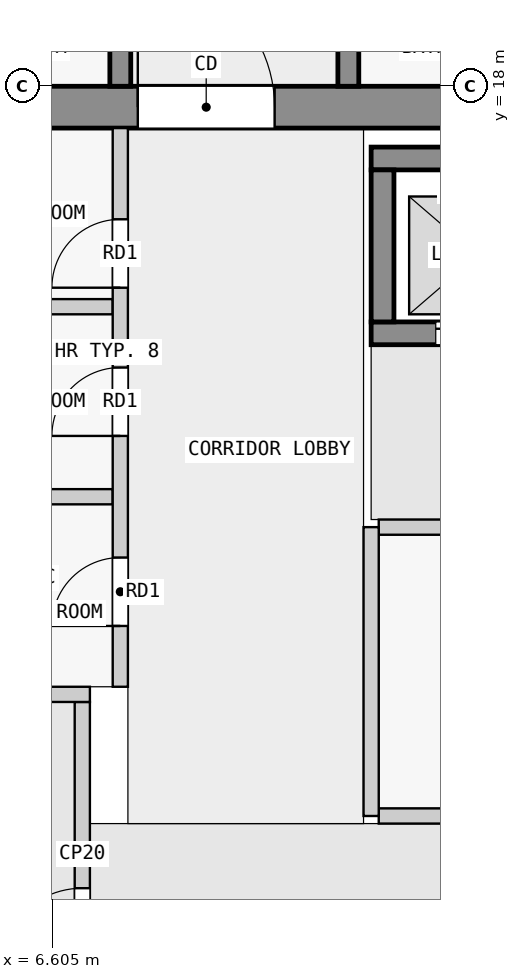
"""IFC4 building model, lengths in metres.
Left out: names, types, materials, properties, quantities, classifications, styles, units other than length and angle.
Written with IfcOpenShell. Run it as: python <this file> out.ifc"""

import sys

from ifc_helpers import new_model, si_unit, direction, frame, frame_2d, origin, place, context, subcontext, project, spatial, rectangle, extrude, element, fill, save


model = new_model("IFC4")
c1 = context("Model", 3, precision=1e-05, world=origin(), true_north=direction((0.0, 1.0)))
c2 = subcontext(c1, "Body", "Model", "MODEL_VIEW")
j1 = project(units=[si_unit("LENGTHUNIT", "METRE"), si_unit("PLANEANGLEUNIT", "RADIAN")], contexts=[c1])
p1 = place(None, origin())
s1 = spatial("IfcSite", under=j1, at=p1, CompositionType="ELEMENT")
p2 = place(p1, origin())
s2 = spatial("IfcBuilding", under=s1, at=p2, CompositionType="ELEMENT")
p3 = place(p2, frame((0.0, 0.0, 194.4)))
s3 = spatial("IfcBuildingStorey", under=s2, at=p3, CompositionType="ELEMENT", Elevation=194.4)
p4 = place(p3, frame((1.38, 17.725, 0.0), z_axis=(0.0, 0.0, 1.0), x_axis=(1.0, 0.0, 0.0)))
e1 = element("IfcWall", 1, at=p4, inside=s3, PredefinedType="SHEAR", context=c2, shape_type="SweptSolid", body=[
    extrude(rectangle(XDim=21.12, YDim=0.55, at=frame_2d((10.56, 0.0))), origin(), (0.0, 0.0, 1.0), 3.25),
])
p5 = place(p4, frame((6.35, 0.0, 0.0)))
e2 = element("IfcOpeningElement", 2, at=p5, cuts=e1, PredefinedType="OPENING", context=c2, shape_type="SweptSolid", body=[
    extrude(rectangle(XDim=1.8, YDim=2.1, at=frame_2d((0.9, 1.05))), frame((0.0, 0.285, 0.0), z_axis=(0.0, -1.0, 0.0), x_axis=(1.0, 0.0, 0.0)), (0.0, 0.0, 1.0), 0.57),
])
p6 = place(p3, frame((10.8, 17.05, 0.0), z_axis=(0.0, 0.0, 1.0), x_axis=(1.0, 0.0, 0.0)))
e3 = element("IfcWall", 3, at=p6, inside=s3, PredefinedType="SHEAR", context=c2, shape_type="SweptSolid", body=[
    extrude(rectangle(XDim=7.8, YDim=0.3, at=frame_2d((3.9, 0.0))), origin(), (0.0, 0.0, 1.0), 3.25),
])
p7 = place(p3, frame((10.8, 14.75, 0.0), z_axis=(0.0, 0.0, 1.0), x_axis=(1.0, 0.0, 0.0)))
e4 = element("IfcWall", 4, at=p7, inside=s3, PredefinedType="SHEAR", context=c2, shape_type="SweptSolid", body=[
    extrude(rectangle(XDim=7.8, YDim=0.3, at=frame_2d((3.9, 0.0))), origin(), (0.0, 0.0, 1.0), 3.25),
])
p8 = place(p7, frame((0.85, 0.0, 0.0)))
e5 = element("IfcOpeningElement", 5, at=p8, cuts=e4, PredefinedType="OPENING", context=c2, shape_type="SweptSolid", body=[
    extrude(rectangle(XDim=1.1, YDim=2.1, at=frame_2d((0.55, 1.05))), frame((0.0, 0.16, 0.0), z_axis=(0.0, -1.0, 0.0), x_axis=(1.0, 0.0, 0.0)), (0.0, 0.0, 1.0), 0.32),
])
p9 = place(p7, frame((3.35, 0.0, 0.0)))
e6 = element("IfcOpeningElement", 6, at=p9, cuts=e4, PredefinedType="OPENING", context=c2, shape_type="SweptSolid", body=[
    extrude(rectangle(XDim=1.1, YDim=2.1, at=frame_2d((0.55, 1.05))), frame((0.0, 0.16, 0.0), z_axis=(0.0, -1.0, 0.0), x_axis=(1.0, 0.0, 0.0)), (0.0, 0.0, 1.0), 0.32),
])
p10 = place(p7, frame((5.85, 0.0, 0.0)))
e7 = element("IfcOpeningElement", 7, at=p10, cuts=e4, PredefinedType="OPENING", context=c2, shape_type="SweptSolid", body=[
    extrude(rectangle(XDim=1.1, YDim=2.1, at=frame_2d((0.55, 1.05))), frame((0.0, 0.16, 0.0), z_axis=(0.0, -1.0, 0.0), x_axis=(1.0, 0.0, 0.0)), (0.0, 0.0, 1.0), 0.32),
])
p11 = place(p3, frame((10.95, 14.9, 0.0), z_axis=(0.0, 0.0, 1.0), x_axis=(0.0, 1.0, 0.0)))
e8 = element("IfcWall", 8, at=p11, inside=s3, PredefinedType="SHEAR", context=c2, shape_type="SweptSolid", body=[
    extrude(rectangle(XDim=2.0, YDim=0.3, at=frame_2d((1.0, 0.0))), origin(), (0.0, 0.0, 1.0), 3.25),
])
p12 = place(p3, frame((7.5, 18.0, 0.0), z_axis=(0.0, 0.0, 1.0), x_axis=(0.0, 1.0, 0.0)))
e9 = element("IfcWall", 9, at=p12, inside=s3, PredefinedType="SHEAR", context=c2, shape_type="SweptSolid", body=[
    extrude(rectangle(XDim=27.0, YDim=0.275, at=frame_2d((13.5, 0.0))), origin(), (0.0, 0.0, 1.0), 3.25),
])
p13 = place(p12, frame((1.75, 0.0, 0.0)))
e10 = element("IfcOpeningElement", 10, at=p13, cuts=e9, PredefinedType="OPENING", context=c2, shape_type="SweptSolid", body=[
    extrude(rectangle(XDim=1.0, YDim=2.1, at=frame_2d((0.5, 1.05))), frame((0.0, 0.147, 0.0), z_axis=(0.0, -1.0, 0.0), x_axis=(1.0, 0.0, 0.0)), (0.0, 0.0, 1.0), 0.295),
])
p14 = place(p12, frame((5.85, 0.0, 0.0)))
e11 = element("IfcOpeningElement", 11, at=p14, cuts=e9, PredefinedType="OPENING", context=c2, shape_type="SweptSolid", body=[
    extrude(rectangle(XDim=1.8, YDim=2.1, at=frame_2d((0.9, 1.05))), frame((0.0, 0.147, 0.0), z_axis=(0.0, -1.0, 0.0), x_axis=(1.0, 0.0, 0.0)), (0.0, 0.0, 1.0), 0.295),
])
p15 = place(p12, frame((10.75, 0.0, 0.0)))
e12 = element("IfcOpeningElement", 12, at=p15, cuts=e9, PredefinedType="OPENING", context=c2, shape_type="SweptSolid", body=[
    extrude(rectangle(XDim=1.0, YDim=2.1, at=frame_2d((0.5, 1.05))), frame((0.0, 0.147, 0.0), z_axis=(0.0, -1.0, 0.0), x_axis=(1.0, 0.0, 0.0)), (0.0, 0.0, 1.0), 0.295),
])
p16 = place(p12, frame((15.25, 0.0, 0.0)))
e13 = element("IfcOpeningElement", 13, at=p16, cuts=e9, PredefinedType="OPENING", context=c2, shape_type="SweptSolid", body=[
    extrude(rectangle(XDim=1.0, YDim=2.1, at=frame_2d((0.5, 1.05))), frame((0.0, 0.147, 0.0), z_axis=(0.0, -1.0, 0.0), x_axis=(1.0, 0.0, 0.0)), (0.0, 0.0, 1.0), 0.295),
])
p17 = place(p12, frame((21.35, 0.0, 0.0)))
e14 = element("IfcOpeningElement", 14, at=p17, cuts=e9, PredefinedType="OPENING", context=c2, shape_type="SweptSolid", body=[
    extrude(rectangle(XDim=1.0, YDim=2.1, at=frame_2d((0.5, 1.05))), frame((0.0, 0.147, 0.0), z_axis=(0.0, -1.0, 0.0), x_axis=(1.0, 0.0, 0.0)), (0.0, 0.0, 1.0), 0.295),
])
p18 = place(p3, frame((10.5, 18.0, 0.0), z_axis=(0.0, 0.0, 1.0), x_axis=(0.0, 1.0, 0.0)))
e15 = element("IfcWall", 15, at=p18, inside=s3, PredefinedType="SHEAR", context=c2, shape_type="SweptSolid", body=[
    extrude(rectangle(XDim=27.0, YDim=0.275, at=frame_2d((13.5, 0.0))), origin(), (0.0, 0.0, 1.0), 3.25),
])
p19 = place(p18, frame((1.75, 0.0, 0.0)))
e16 = element("IfcOpeningElement", 16, at=p19, cuts=e15, PredefinedType="OPENING", context=c2, shape_type="SweptSolid", body=[
    extrude(rectangle(XDim=1.0, YDim=2.1, at=frame_2d((0.5, 1.05))), frame((0.0, 0.147, 0.0), z_axis=(0.0, -1.0, 0.0), x_axis=(1.0, 0.0, 0.0)), (0.0, 0.0, 1.0), 0.295),
])
p20 = place(p18, frame((6.25, 0.0, 0.0)))
e17 = element("IfcOpeningElement", 17, at=p20, cuts=e15, PredefinedType="OPENING", context=c2, shape_type="SweptSolid", body=[
    extrude(rectangle(XDim=1.0, YDim=2.1, at=frame_2d((0.5, 1.05))), frame((0.0, 0.147, 0.0), z_axis=(0.0, -1.0, 0.0), x_axis=(1.0, 0.0, 0.0)), (0.0, 0.0, 1.0), 0.295),
])
p21 = place(p18, frame((15.25, 0.0, 0.0)))
e18 = element("IfcOpeningElement", 18, at=p21, cuts=e15, PredefinedType="OPENING", context=c2, shape_type="SweptSolid", body=[
    extrude(rectangle(XDim=1.0, YDim=2.1, at=frame_2d((0.5, 1.05))), frame((0.0, 0.147, 0.0), z_axis=(0.0, -1.0, 0.0), x_axis=(1.0, 0.0, 0.0)), (0.0, 0.0, 1.0), 0.295),
])
p22 = place(p18, frame((19.75, 0.0, 0.0)))
e19 = element("IfcOpeningElement", 19, at=p22, cuts=e15, PredefinedType="OPENING", context=c2, shape_type="SweptSolid", body=[
    extrude(rectangle(XDim=1.0, YDim=2.1, at=frame_2d((0.5, 1.05))), frame((0.0, 0.147, 0.0), z_axis=(0.0, -1.0, 0.0), x_axis=(1.0, 0.0, 0.0)), (0.0, 0.0, 1.0), 0.295),
])
p23 = place(p18, frame((23.25, 0.0, 0.0)))
e20 = element("IfcOpeningElement", 20, at=p23, cuts=e15, PredefinedType="OPENING", context=c2, shape_type="SweptSolid", body=[
    extrude(rectangle(XDim=0.9, YDim=2.1, at=frame_2d((0.45, 1.05))), frame((0.0, 0.147, 0.0), z_axis=(0.0, -1.0, 0.0), x_axis=(1.0, 0.0, 0.0)), (0.0, 0.0, 1.0), 0.295),
])
p24 = place(p18, frame((25.45, 0.0, 0.0)))
e21 = element("IfcOpeningElement", 21, at=p24, cuts=e15, PredefinedType="OPENING", context=c2, shape_type="SweptSolid", body=[
    extrude(rectangle(XDim=1.0, YDim=2.1, at=frame_2d((0.5, 1.05))), frame((0.0, 0.147, 0.0), z_axis=(0.0, -1.0, 0.0), x_axis=(1.0, 0.0, 0.0)), (0.0, 0.0, 1.0), 0.295),
])
p25 = place(p3, frame((7.0, 5.9, 0.0), z_axis=(0.0, 0.0, 1.0), x_axis=(0.0, 1.0, 0.0)))
e22 = element("IfcWall", 22, at=p25, inside=s3, PredefinedType="PARTITIONING", context=c2, shape_type="SweptSolid", body=[
    extrude(rectangle(XDim=4.0, YDim=0.2, at=frame_2d((2.0, 0.0))), origin(), (0.0, 0.0, 1.0), 3.25),
])
p26 = place(p25, frame((0.45, 0.0, 0.0)))
e23 = element("IfcOpeningElement", 23, at=p26, cuts=e22, PredefinedType="OPENING", context=c2, shape_type="SweptSolid", body=[
    extrude(rectangle(XDim=1.1, YDim=2.1, at=frame_2d((0.55, 1.05))), frame((0.0, 0.11, 0.0), z_axis=(0.0, -1.0, 0.0), x_axis=(1.0, 0.0, 0.0)), (0.0, 0.0, 1.0), 0.22),
])
p27 = place(p3, frame((5.15, 10.0, 0.0), z_axis=(0.0, 0.0, 1.0), x_axis=(1.0, 0.0, 0.0)))
e24 = element("IfcWall", 24, at=p27, inside=s3, PredefinedType="PARTITIONING", context=c2, shape_type="SweptSolid", body=[
    extrude(rectangle(XDim=1.95, YDim=0.2, at=frame_2d((0.975, 0.0))), origin(), (0.0, 0.0, 1.0), 3.25),
])
p28 = place(p3, frame((10.8, 8.4, 0.0), z_axis=(0.0, 0.0, 1.0), x_axis=(0.0, 1.0, 0.0)))
e25 = element("IfcWall", 25, at=p28, inside=s3, PredefinedType="PARTITIONING", context=c2, shape_type="SweptSolid", body=[
    extrude(rectangle(XDim=3.8, YDim=0.2, at=frame_2d((1.9, 0.0))), origin(), (0.0, 0.0, 1.0), 3.25),
])
p29 = place(p3, frame((10.9, 8.4, 0.0), z_axis=(0.0, 0.0, 1.0), x_axis=(1.0, 0.0, 0.0)))
e26 = element("IfcWall", 26, at=p29, inside=s3, PredefinedType="PARTITIONING", context=c2, shape_type="SweptSolid", body=[
    extrude(rectangle(XDim=8.55, YDim=0.2, at=frame_2d((4.275, 0.0))), origin(), (0.0, 0.0, 1.0), 3.25),
])
p30 = place(p3, frame((10.9, 12.2, 0.0), z_axis=(0.0, 0.0, 1.0), x_axis=(1.0, 0.0, 0.0)))
e27 = element("IfcWall", 27, at=p30, inside=s3, PredefinedType="PARTITIONING", context=c2, shape_type="SweptSolid", body=[
    extrude(rectangle(XDim=8.55, YDim=0.2, at=frame_2d((4.275, 0.0))), origin(), (0.0, 0.0, 1.0), 3.25),
])
p31 = place(p30, frame((1.425, 0.0, 0.0)))
e28 = element("IfcOpeningElement", 28, at=p31, cuts=e27, PredefinedType="OPENING", context=c2, shape_type="SweptSolid", body=[
    extrude(rectangle(XDim=0.9, YDim=2.1, at=frame_2d((0.45, 1.05))), frame((0.0, 0.11, 0.0), z_axis=(0.0, -1.0, 0.0), x_axis=(1.0, 0.0, 0.0)), (0.0, 0.0, 1.0), 0.22),
])
p32 = place(p30, frame((5.8, 0.0, 0.0)))
e29 = element("IfcOpeningElement", 29, at=p32, cuts=e27, PredefinedType="OPENING", context=c2, shape_type="SweptSolid", body=[
    extrude(rectangle(XDim=0.9, YDim=2.1, at=frame_2d((0.45, 1.05))), frame((0.0, 0.11, 0.0), z_axis=(0.0, -1.0, 0.0), x_axis=(1.0, 0.0, 0.0)), (0.0, 0.0, 1.0), 0.22),
])
p33 = place(p3, frame((7.5, 10.1, 0.0), z_axis=(0.0, 0.0, 1.0), x_axis=(0.0, 1.0, 0.0)))
e30 = element("IfcWall", 30, at=p33, inside=s3, PredefinedType="PARTITIONING", context=c2, shape_type="SweptSolid", body=[
    extrude(rectangle(XDim=7.35, YDim=0.2, at=frame_2d((3.675, 0.0))), origin(), (0.0, 0.0, 1.0), 3.25),
])
p34 = place(p33, frame((0.8, 0.0, 0.0)))
e31 = element("IfcOpeningElement", 31, at=p34, cuts=e30, PredefinedType="OPENING", context=c2, shape_type="SweptSolid", body=[
    extrude(rectangle(XDim=0.9, YDim=2.1, at=frame_2d((0.45, 1.05))), frame((0.0, 0.11, 0.0), z_axis=(0.0, -1.0, 0.0), x_axis=(1.0, 0.0, 0.0)), (0.0, 0.0, 1.0), 0.22),
])
p35 = place(p33, frame((3.3, 0.0, 0.0)))
e32 = element("IfcOpeningElement", 32, at=p35, cuts=e30, PredefinedType="OPENING", context=c2, shape_type="SweptSolid", body=[
    extrude(rectangle(XDim=0.9, YDim=2.1, at=frame_2d((0.45, 1.05))), frame((0.0, 0.11, 0.0), z_axis=(0.0, -1.0, 0.0), x_axis=(1.0, 0.0, 0.0)), (0.0, 0.0, 1.0), 0.22),
])
p36 = place(p33, frame((5.25, 0.0, 0.0)))
e33 = element("IfcOpeningElement", 33, at=p36, cuts=e30, PredefinedType="OPENING", context=c2, shape_type="SweptSolid", body=[
    extrude(rectangle(XDim=0.9, YDim=2.1, at=frame_2d((0.45, 1.05))), frame((0.0, 0.11, 0.0), z_axis=(0.0, -1.0, 0.0), x_axis=(1.0, 0.0, 0.0)), (0.0, 0.0, 1.0), 0.22),
])
for number, where, z_axis, x_axis in (
    (34, (5.15, 12.6, 0.0), (0.0, 0.0, 1.0), (1.0, 0.0, 0.0)),
    (35, (5.15, 15.1, 0.0), (0.0, 0.0, 1.0), (1.0, 0.0, 0.0)),
):
    element("IfcWall", number, at=place(p3, frame(where, z_axis=z_axis, x_axis=x_axis)), inside=s3, PredefinedType="PARTITIONING", context=c2, shape_type="SweptSolid", body=[
        extrude(rectangle(XDim=2.25, YDim=0.2, at=frame_2d((1.125, 0.0))), origin(), (0.0, 0.0, 1.0), 3.25),
    ])
p37 = place(p26, origin())
e36 = element("IfcDoor", 36, at=p37, inside=s3, OperationType="SINGLE_SWING_LEFT", PredefinedType="DOOR", context=c2, shape_type="SweptSolid", body=[
    extrude(rectangle(XDim=1.1, YDim=2.1, at=frame_2d((0.55, 1.05))), frame((0.0, 0.025, 0.0), z_axis=(0.0, -1.0, 0.0), x_axis=(1.0, 0.0, 0.0)), (0.0, 0.0, 1.0), 0.05),
])
fill(e23, e36)
p38 = place(p8, origin())
e37 = element("IfcDoor", 37, at=p38, inside=s3, OperationType="DOUBLE_DOOR_SLIDING", PredefinedType="DOOR", context=c2, shape_type="SweptSolid", body=[
    extrude(rectangle(XDim=1.1, YDim=2.1, at=frame_2d((0.55, 1.05))), frame((0.0, 0.025, 0.0), z_axis=(0.0, -1.0, 0.0), x_axis=(1.0, 0.0, 0.0)), (0.0, 0.0, 1.0), 0.05),
])
fill(e5, e37)
p39 = place(p5, origin())
e38 = element("IfcDoor", 38, at=p39, inside=s3, OperationType="DOUBLE_DOOR_SINGLE_SWING", PredefinedType="DOOR", context=c2, shape_type="SweptSolid", body=[
    extrude(rectangle(XDim=1.8, YDim=2.1, at=frame_2d((0.9, 1.05))), frame((0.0, 0.025, 0.0), z_axis=(0.0, -1.0, 0.0), x_axis=(1.0, 0.0, 0.0)), (0.0, 0.0, 1.0), 0.05),
])
fill(e2, e38)
p40 = place(p34, origin())
e39 = element("IfcDoor", 39, at=p40, inside=s3, OperationType="SINGLE_SWING_RIGHT", PredefinedType="DOOR", context=c2, shape_type="SweptSolid", body=[
    extrude(rectangle(XDim=0.9, YDim=2.1, at=frame_2d((0.45, 1.05))), frame((0.0, 0.025, 0.0), z_axis=(0.0, -1.0, 0.0), x_axis=(1.0, 0.0, 0.0)), (0.0, 0.0, 1.0), 0.05),
])
fill(e31, e39)
p41 = place(p35, origin())
e40 = element("IfcDoor", 40, at=p41, inside=s3, OperationType="SINGLE_SWING_RIGHT", PredefinedType="DOOR", context=c2, shape_type="SweptSolid", body=[
    extrude(rectangle(XDim=0.9, YDim=2.1, at=frame_2d((0.45, 1.05))), frame((0.0, 0.025, 0.0), z_axis=(0.0, -1.0, 0.0), x_axis=(1.0, 0.0, 0.0)), (0.0, 0.0, 1.0), 0.05),
])
fill(e32, e40)
p42 = place(p36, origin())
e41 = element("IfcDoor", 41, at=p42, inside=s3, OperationType="SINGLE_SWING_RIGHT", PredefinedType="DOOR", context=c2, shape_type="SweptSolid", body=[
    extrude(rectangle(XDim=0.9, YDim=2.1, at=frame_2d((0.45, 1.05))), frame((0.0, 0.025, 0.0), z_axis=(0.0, -1.0, 0.0), x_axis=(1.0, 0.0, 0.0)), (0.0, 0.0, 1.0), 0.05),
])
fill(e33, e41)
save(model, sys.argv[1])
